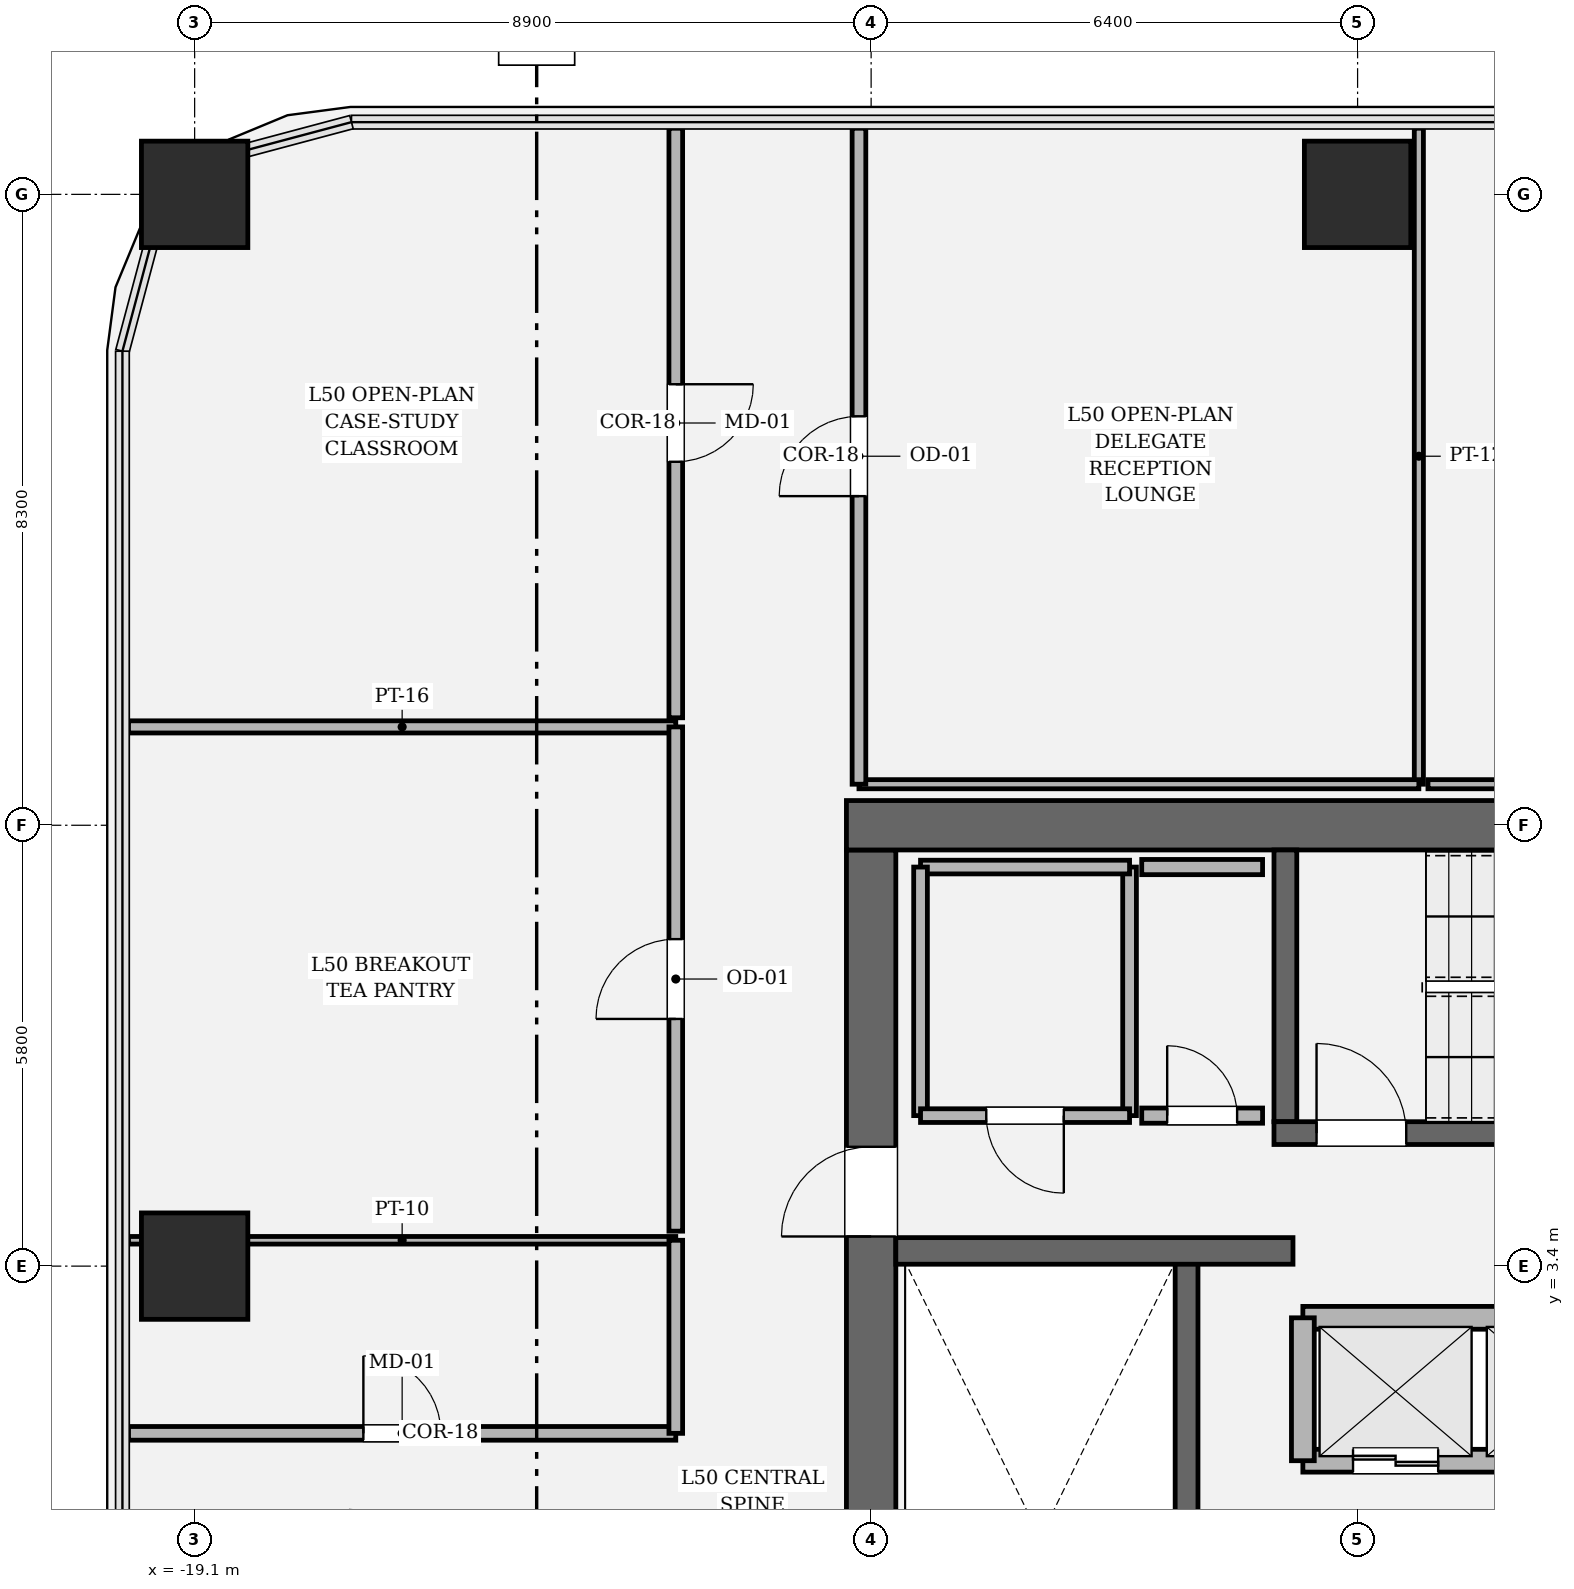
"""IFC4 building model, lengths in metres.
Left out: names, types, materials, properties, quantities, classifications, styles, units other than length and angle.
Written with IfcOpenShell. Run it as: python <this file> out.ifc"""

import sys

from ifc_helpers import new_model, si_unit, direction, frame, frame_2d, origin, origin_2d, place, context, subcontext, project, spatial, rectangle, hollow_rectangle, extrude, element, fill, save


model = new_model("IFC4")
c1 = context("Model", 3, precision=1e-05, world=origin(), true_north=direction((0.0, 1.0)))
c2 = subcontext(c1, "Body", "Model", "MODEL_VIEW")
j1 = project(units=[si_unit("LENGTHUNIT", "METRE"), si_unit("PLANEANGLEUNIT", "RADIAN")], contexts=[c1])
p1 = place(None, origin())
s1 = spatial("IfcSite", under=j1, at=p1, CompositionType="ELEMENT")
p2 = place(p1, origin())
s2 = spatial("IfcBuilding", under=s1, at=p2, CompositionType="ELEMENT")
p3 = place(p2, frame((0.0, 0.0, 212.7)))
s3 = spatial("IfcBuildingStorey", under=s2, at=p3, CompositionType="ELEMENT", Elevation=212.7)
p4 = place(p3, frame((-10.2, -8.875, 0.0), z_axis=(0.0, 0.0, 1.0), x_axis=(0.0, 1.0, 0.0)))
e1 = element("IfcWall", 1, at=p4, inside=s3, PredefinedType="SHEAR", context=c2, shape_type="SweptSolid", body=[
    extrude(rectangle(XDim=17.75, YDim=0.65, at=frame_2d((8.875, 0.0))), origin(), (0.0, 0.0, 1.0), 4.05),
])
p5 = place(p4, frame((12.665, 0.0, 0.0)))
e2 = element("IfcOpeningElement", 2, at=p5, cuts=e1, PredefinedType="OPENING", context=c2, shape_type="SweptSolid", body=[
    extrude(rectangle(XDim=1.18, YDim=2.2, at=frame_2d((0.59, 1.1))), frame((0.0, 0.335, 0.0), z_axis=(0.0, -1.0, 0.0), x_axis=(1.0, 0.0, 0.0)), (0.0, 0.0, 1.0), 0.67),
])
p6 = place(p3, frame((-10.525, 9.2, 0.0), z_axis=(0.0, 0.0, 1.0), x_axis=(1.0, 0.0, 0.0)))
e3 = element("IfcWall", 3, at=p6, inside=s3, PredefinedType="SHEAR", context=c2, shape_type="SweptSolid", body=[
    extrude(rectangle(XDim=21.05, YDim=0.65, at=frame_2d((10.525, 0.0))), origin(), (0.0, 0.0, 1.0), 4.05),
])
p7 = place(p3, frame((-6.05, -5.5, 0.0), z_axis=(0.0, 0.0, 1.0), x_axis=(0.0, 1.0, 0.0)))
e4 = element("IfcWall", 4, at=p7, inside=s3, PredefinedType="SOLIDWALL", context=c2, shape_type="SweptSolid", body=[
    extrude(rectangle(XDim=8.95, YDim=0.3, at=frame_2d((4.475, 0.0))), origin(), (0.0, 0.0, 1.0), 4.05),
])
p8 = place(p3, frame((-4.75, 5.3, 0.0), z_axis=(0.0, 0.0, 1.0), x_axis=(0.0, 1.0, 0.0)))
e5 = element("IfcWall", 5, at=p8, inside=s3, PredefinedType="SOLIDWALL", context=c2, shape_type="SweptSolid", body=[
    extrude(rectangle(XDim=3.575, YDim=0.3, at=frame_2d((1.788, 0.0))), origin(), (0.0, 0.0, 1.0), 4.05),
])
p9 = place(p3, frame((-4.9, 5.15, 0.0), z_axis=(0.0, 0.0, 1.0), x_axis=(1.0, 0.0, 0.0)))
e6 = element("IfcWall", 6, at=p9, inside=s3, PredefinedType="SOLIDWALL", context=c2, shape_type="SweptSolid", body=[
    extrude(rectangle(XDim=9.8, YDim=0.3, at=frame_2d((4.9, 0.0))), origin(), (0.0, 0.0, 1.0), 4.05),
])
p10 = place(p9, frame((0.56, 0.0, 0.0)))
e7 = element("IfcOpeningElement", 7, at=p10, cuts=e6, PredefinedType="OPENING", context=c2, shape_type="SweptSolid", body=[
    extrude(rectangle(XDim=1.18, YDim=2.2, at=frame_2d((0.59, 1.1))), frame((0.0, 0.16, 0.0), z_axis=(0.0, -1.0, 0.0), x_axis=(1.0, 0.0, 0.0)), (0.0, 0.0, 1.0), 0.32),
])
p11 = place(p3, frame((-9.875, 3.6, 0.0), z_axis=(0.0, 0.0, 1.0), x_axis=(1.0, 0.0, 0.0)))
e8 = element("IfcWall", 8, at=p11, inside=s3, PredefinedType="SOLIDWALL", context=c2, shape_type="SweptSolid", body=[
    extrude(rectangle(XDim=5.225, YDim=0.35, at=frame_2d((2.613, 0.0))), origin(), (0.0, 0.0, 1.0), 4.05),
])
for number, where, z_axis, x_axis in (
    (9, (-3.8, 17.5, 0.0), (0.0, 0.0, 1.0), (1.0, 0.0, 0.0)),
    (10, (-19.1, 17.5, 0.0), (0.0, 0.0, 1.0), (1.0, 0.0, 0.0)),
    (11, (-19.1, 3.4, 0.0), (0.0, 0.0, 1.0), (1.0, 0.0, 0.0)),
):
    element("IfcColumn", number, at=place(p3, frame(where, z_axis=z_axis, x_axis=x_axis)), inside=s3, PredefinedType="COLUMN", context=c2, shape_type="SweptSolid", body=[
        extrude(hollow_rectangle(XDim=1.4, YDim=1.4, WallThickness=0.042, at=origin_2d()), origin(), (0.0, 0.0, 1.0), 4.05),
    ])
p12 = place(p3, frame((-4.52, 0.84, 0.0), z_axis=(0.0, 0.0, 1.0), x_axis=(1.0, 0.0, 0.0)))
e12 = element("IfcWall", 12, at=p12, inside=s3, PredefinedType="SOLIDWALL", context=c2, shape_type="SweptSolid", body=[
    extrude(rectangle(XDim=9.04, YDim=0.3, at=frame_2d((4.52, 0.0))), origin(), (0.0, 0.0, 1.0), 3.83),
])
p13 = place(p12, frame((0.66, 0.0, 0.0)))
e13 = element("IfcOpeningElement", 13, at=p13, cuts=e12, PredefinedType="OPENING", context=c2, shape_type="SweptSolid", body=[
    extrude(rectangle(XDim=1.12, YDim=2.25, at=frame_2d((0.56, 1.125))), frame((0.0, 0.16, 0.0), z_axis=(0.0, -1.0, 0.0), x_axis=(1.0, 0.0, 0.0)), (0.0, 0.0, 1.0), 0.32),
])
p14 = place(p12, frame((2.86, 0.0, 0.0)))
e14 = element("IfcOpeningElement", 14, at=p14, cuts=e12, PredefinedType="OPENING", context=c2, shape_type="SweptSolid", body=[
    extrude(rectangle(XDim=1.12, YDim=2.25, at=frame_2d((0.56, 1.125))), frame((0.0, 0.16, 0.0), z_axis=(0.0, -1.0, 0.0), x_axis=(1.0, 0.0, 0.0)), (0.0, 0.0, 1.0), 0.32),
])
p15 = place(p12, frame((5.06, 0.0, 0.0)))
e15 = element("IfcOpeningElement", 15, at=p15, cuts=e12, PredefinedType="OPENING", context=c2, shape_type="SweptSolid", body=[
    extrude(rectangle(XDim=1.12, YDim=2.25, at=frame_2d((0.56, 1.125))), frame((0.0, 0.16, 0.0), z_axis=(0.0, -1.0, 0.0), x_axis=(1.0, 0.0, 0.0)), (0.0, 0.0, 1.0), 0.32),
])
p16 = place(p12, frame((7.26, 0.0, 0.0)))
e16 = element("IfcOpeningElement", 16, at=p16, cuts=e12, PredefinedType="OPENING", context=c2, shape_type="SweptSolid", body=[
    extrude(rectangle(XDim=1.12, YDim=2.25, at=frame_2d((0.56, 1.125))), frame((0.0, 0.16, 0.0), z_axis=(0.0, -1.0, 0.0), x_axis=(1.0, 0.0, 0.0)), (0.0, 0.0, 1.0), 0.32),
])
p17 = place(p3, frame((-4.52, 2.72, 0.0), z_axis=(0.0, 0.0, 1.0), x_axis=(1.0, 0.0, 0.0)))
e17 = element("IfcWall", 17, at=p17, inside=s3, PredefinedType="SOLIDWALL", context=c2, shape_type="SweptSolid", body=[
    extrude(rectangle(XDim=9.04, YDim=0.3, at=frame_2d((4.52, 0.0))), origin(), (0.0, 0.0, 1.0), 3.83),
])
p18 = place(p3, frame((-4.52, 0.84, 0.0), z_axis=(0.0, 0.0, 1.0), x_axis=(0.0, 1.0, 0.0)))
e18 = element("IfcWall", 18, at=p18, inside=s3, PredefinedType="SOLIDWALL", context=c2, shape_type="SweptSolid", body=[
    extrude(rectangle(XDim=1.88, YDim=0.3, at=frame_2d((0.94, 0.0))), origin(), (0.0, 0.0, 1.0), 3.83),
])
p19 = place(p3, frame((-6.8, 5.38, 0.0), z_axis=(0.0, 0.0, 1.0), x_axis=(0.0, 1.0, 0.0)))
e19 = element("IfcWall", 19, at=p19, inside=s3, PredefinedType="PARTITIONING", context=c2, shape_type="SweptSolid", body=[
    extrude(rectangle(XDim=3.27, YDim=0.18, at=frame_2d((1.635, 0.0))), origin(), (0.0, 0.0, 1.0), 3.83),
])
p20 = place(p3, frame((-6.8, 8.65, 0.0), z_axis=(0.0, 0.0, 1.0), x_axis=(-1.0, 0.0, 0.0)))
e20 = element("IfcWall", 20, at=p20, inside=s3, PredefinedType="PARTITIONING", context=c2, shape_type="SweptSolid", body=[
    extrude(rectangle(XDim=2.75, YDim=0.18, at=frame_2d((1.375, 0.0))), origin(), (0.0, 0.0, 1.0), 3.83),
])
p21 = place(p3, frame((-9.55, 8.65, 0.0), z_axis=(0.0, 0.0, 1.0), x_axis=(0.0, -1.0, 0.0)))
e21 = element("IfcWall", 21, at=p21, inside=s3, PredefinedType="PARTITIONING", context=c2, shape_type="SweptSolid", body=[
    extrude(rectangle(XDim=3.27, YDim=0.18, at=frame_2d((1.635, 0.0))), origin(), (0.0, 0.0, 1.0), 3.83),
])
p22 = place(p3, frame((-9.55, 5.38, 0.0), z_axis=(0.0, 0.0, 1.0), x_axis=(1.0, 0.0, 0.0)))
e22 = element("IfcWall", 22, at=p22, inside=s3, PredefinedType="PARTITIONING", context=c2, shape_type="SweptSolid", body=[
    extrude(rectangle(XDim=2.75, YDim=0.18, at=frame_2d((1.375, 0.0))), origin(), (0.0, 0.0, 1.0), 3.83),
])
p23 = place(p22, frame((0.865, 0.0, 0.0)))
e23 = element("IfcOpeningElement", 23, at=p23, cuts=e22, PredefinedType="OPENING", context=c2, shape_type="SweptSolid", body=[
    extrude(rectangle(XDim=1.02, YDim=2.2, at=frame_2d((0.51, 1.1))), frame((0.0, 0.1, 0.0), z_axis=(0.0, -1.0, 0.0), x_axis=(1.0, 0.0, 0.0)), (0.0, 0.0, 1.0), 0.2),
])
p24 = place(p3, frame((-5.05, 8.65, 0.0), z_axis=(0.0, 0.0, 1.0), x_axis=(-1.0, 0.0, 0.0)))
e24 = element("IfcWall", 24, at=p24, inside=s3, PredefinedType="SOLIDWALL", context=c2, shape_type="SweptSolid", body=[
    extrude(rectangle(XDim=1.59, YDim=0.2, at=frame_2d((0.795, 0.0))), origin(), (0.0, 0.0, 1.0), 3.83),
])
p25 = place(p3, frame((-6.64, 5.38, 0.0), z_axis=(0.0, 0.0, 1.0), x_axis=(1.0, 0.0, 0.0)))
e25 = element("IfcWall", 25, at=p25, inside=s3, PredefinedType="SOLIDWALL", context=c2, shape_type="SweptSolid", body=[
    extrude(rectangle(XDim=1.59, YDim=0.2, at=frame_2d((0.795, 0.0))), origin(), (0.0, 0.0, 1.0), 3.83),
])
p26 = place(p25, frame((0.335, 0.0, 0.0)))
e26 = element("IfcOpeningElement", 26, at=p26, cuts=e25, PredefinedType="OPENING", context=c2, shape_type="SweptSolid", body=[
    extrude(rectangle(XDim=0.92, YDim=2.1, at=frame_2d((0.46, 1.05))), frame((0.0, 0.11, 0.0), z_axis=(0.0, -1.0, 0.0), x_axis=(1.0, 0.0, 0.0)), (0.0, 0.0, 1.0), 0.22),
])
p27 = place(p3, frame((-12.77, 1.2, 0.0), z_axis=(0.0, 0.0, 1.0), x_axis=(-1.0, 0.0, 0.0)))
e27 = element("IfcWall", 27, at=p27, inside=s3, PredefinedType="PARTITIONING", context=c2, shape_type="SweptSolid", body=[
    extrude(rectangle(XDim=7.2, YDim=0.18, at=frame_2d((3.6, 0.0))), origin(), (0.0, 0.0, 1.0), 3.174),
])
p28 = place(p27, frame((3.09, 0.0, 0.0)))
e28 = element("IfcOpeningElement", 28, at=p28, cuts=e27, PredefinedType="OPENING", context=c2, shape_type="SweptSolid", body=[
    extrude(rectangle(XDim=1.02, YDim=2.2, at=frame_2d((0.51, 1.1))), frame((0.0, 0.1, 0.0), z_axis=(0.0, -1.0, 0.0), x_axis=(1.0, 0.0, 0.0)), (0.0, 0.0, 1.0), 0.2),
])
p29 = place(p3, frame((-19.97, 3.74, 0.0), z_axis=(0.0, 0.0, 1.0), x_axis=(1.0, 0.0, 0.0)))
e29 = element("IfcWall", 29, at=p29, inside=s3, PredefinedType="PARTITIONING", context=c2, shape_type="SweptSolid", body=[
    extrude(rectangle(XDim=7.2, YDim=0.1, at=frame_2d((3.6, 0.0))), origin(), (0.0, 0.0, 1.0), 3.174),
])
p30 = place(p3, frame((-12.77, 3.74, 0.0), z_axis=(0.0, 0.0, 1.0), x_axis=(0.0, -1.0, 0.0)))
e30 = element("IfcWall", 30, at=p30, inside=s3, PredefinedType="PARTITIONING", context=c2, shape_type="SweptSolid", body=[
    extrude(rectangle(XDim=2.54, YDim=0.18, at=frame_2d((1.27, 0.0))), origin(), (0.0, 0.0, 1.0), 3.174),
])
p31 = place(p3, frame((-19.97, 10.494, 0.0), z_axis=(0.0, 0.0, 1.0), x_axis=(1.0, 0.0, 0.0)))
e31 = element("IfcWall", 31, at=p31, inside=s3, PredefinedType="PARTITIONING", context=c2, shape_type="SweptSolid", body=[
    extrude(rectangle(XDim=7.2, YDim=0.16, at=frame_2d((3.6, 0.0))), origin(), (0.0, 0.0, 1.0), 3.174),
])
p32 = place(p3, frame((-12.77, 10.494, 0.0), z_axis=(0.0, 0.0, 1.0), x_axis=(0.0, -1.0, 0.0)))
e32 = element("IfcWall", 32, at=p32, inside=s3, PredefinedType="PARTITIONING", context=c2, shape_type="SweptSolid", body=[
    extrude(rectangle(XDim=6.634, YDim=0.18, at=frame_2d((3.317, 0.0))), origin(), (0.0, 0.0, 1.0), 3.174),
])
p33 = place(p32, frame((2.792, 0.0, 0.0)))
e33 = element("IfcOpeningElement", 33, at=p33, cuts=e32, PredefinedType="OPENING", context=c2, shape_type="SweptSolid", body=[
    extrude(rectangle(XDim=1.05, YDim=2.2, at=frame_2d((0.525, 1.1))), frame((0.0, 0.1, 0.0), z_axis=(0.0, -1.0, 0.0), x_axis=(1.0, 0.0, 0.0)), (0.0, 0.0, 1.0), 0.2),
])
p34 = place(p3, frame((-2.994, 18.37, 0.0), z_axis=(0.0, 0.0, 1.0), x_axis=(0.0, -1.0, 0.0)))
e34 = element("IfcWall", 34, at=p34, inside=s3, PredefinedType="PARTITIONING", context=c2, shape_type="SweptSolid", body=[
    extrude(rectangle(XDim=8.63, YDim=0.12, at=frame_2d((4.315, 0.0))), origin(), (0.0, 0.0, 1.0), 3.174),
])
p35 = place(p3, frame((-2.994, 9.74, 0.0), z_axis=(0.0, 0.0, 1.0), x_axis=(-1.0, 0.0, 0.0)))
e35 = element("IfcWall", 35, at=p35, inside=s3, PredefinedType="PARTITIONING", context=c2, shape_type="SweptSolid", body=[
    extrude(rectangle(XDim=7.366, YDim=0.12, at=frame_2d((3.683, 0.0))), origin(), (0.0, 0.0, 1.0), 3.174),
])
p36 = place(p3, frame((-10.36, 9.74, 0.0), z_axis=(0.0, 0.0, 1.0), x_axis=(0.0, 1.0, 0.0)))
e36 = element("IfcWall", 36, at=p36, inside=s3, PredefinedType="PARTITIONING", context=c2, shape_type="SweptSolid", body=[
    extrude(rectangle(XDim=8.63, YDim=0.18, at=frame_2d((4.315, 0.0))), origin(), (0.0, 0.0, 1.0), 3.174),
])
p37 = place(p36, frame((3.79, 0.0, 0.0)))
e37 = element("IfcOpeningElement", 37, at=p37, cuts=e36, PredefinedType="OPENING", context=c2, shape_type="SweptSolid", body=[
    extrude(rectangle(XDim=1.05, YDim=2.2, at=frame_2d((0.525, 1.1))), frame((0.0, 0.1, 0.0), z_axis=(0.0, -1.0, 0.0), x_axis=(1.0, 0.0, 0.0)), (0.0, 0.0, 1.0), 0.2),
])
p38 = place(p3, frame((10.36, 9.74, 0.0), z_axis=(0.0, 0.0, 1.0), x_axis=(-1.0, 0.0, 0.0)))
e38 = element("IfcWall", 38, at=p38, inside=s3, PredefinedType="PARTITIONING", context=c2, shape_type="SweptSolid", body=[
    extrude(rectangle(XDim=13.234, YDim=0.12, at=frame_2d((6.617, 0.0))), origin(), (0.0, 0.0, 1.0), 3.174),
])
p39 = place(p3, frame((-12.77, 18.37, 0.0), z_axis=(0.0, 0.0, 1.0), x_axis=(0.0, -1.0, 0.0)))
e39 = element("IfcWall", 39, at=p39, inside=s3, PredefinedType="PARTITIONING", context=c2, shape_type="SweptSolid", body=[
    extrude(rectangle(XDim=7.756, YDim=0.18, at=frame_2d((3.878, 0.0))), origin(), (0.0, 0.0, 1.0), 3.174),
])
p40 = place(p39, frame((3.368, 0.0, 0.0)))
e40 = element("IfcOpeningElement", 40, at=p40, cuts=e39, PredefinedType="OPENING", context=c2, shape_type="SweptSolid", body=[
    extrude(rectangle(XDim=1.02, YDim=2.2, at=frame_2d((0.51, 1.1))), frame((0.0, 0.1, 0.0), z_axis=(0.0, -1.0, 0.0), x_axis=(1.0, 0.0, 0.0)), (0.0, 0.0, 1.0), 0.2),
])
p41 = place(p10, origin())
e41 = element("IfcDoor", 41, at=p41, inside=s3, OperationType="SINGLE_SWING_LEFT", PredefinedType="DOOR", context=c2, shape_type="SweptSolid", body=[
    extrude(rectangle(XDim=1.18, YDim=2.2, at=frame_2d((0.59, 1.1))), frame((0.0, 0.025, 0.0), z_axis=(0.0, -1.0, 0.0), x_axis=(1.0, 0.0, 0.0)), (0.0, 0.0, 1.0), 0.05),
])
fill(e7, e41)
p42 = place(p5, origin())
e42 = element("IfcDoor", 42, at=p42, inside=s3, OperationType="SINGLE_SWING_LEFT", PredefinedType="DOOR", context=c2, shape_type="SweptSolid", body=[
    extrude(rectangle(XDim=1.18, YDim=2.2, at=frame_2d((0.59, 1.1))), frame((0.0, 0.025, 0.0), z_axis=(0.0, -1.0, 0.0), x_axis=(1.0, 0.0, 0.0)), (0.0, 0.0, 1.0), 0.05),
])
fill(e2, e42)
p43 = place(p13, origin())
e43 = element("IfcDoor", 43, at=p43, inside=s3, OperationType="DOUBLE_DOOR_SLIDING", PredefinedType="DOOR", context=c2, shape_type="SweptSolid", body=[
    extrude(rectangle(XDim=1.12, YDim=2.25, at=frame_2d((0.56, 1.125))), frame((0.0, 0.025, 0.0), z_axis=(0.0, -1.0, 0.0), x_axis=(1.0, 0.0, 0.0)), (0.0, 0.0, 1.0), 0.05),
])
fill(e13, e43)
p44 = place(p23, origin())
e44 = element("IfcDoor", 44, at=p44, inside=s3, OperationType="SINGLE_SWING_RIGHT", PredefinedType="DOOR", context=c2, shape_type="SweptSolid", body=[
    extrude(rectangle(XDim=1.02, YDim=2.2, at=frame_2d((0.51, 1.1))), frame((0.0, 0.025, 0.0), z_axis=(0.0, -1.0, 0.0), x_axis=(1.0, 0.0, 0.0)), (0.0, 0.0, 1.0), 0.05),
])
fill(e23, e44)
p45 = place(p26, origin())
e45 = element("IfcDoor", 45, at=p45, inside=s3, OperationType="SINGLE_SWING_LEFT", PredefinedType="DOOR", context=c2, shape_type="SweptSolid", body=[
    extrude(rectangle(XDim=0.92, YDim=2.1, at=frame_2d((0.46, 1.05))), frame((0.0, 0.025, 0.0), z_axis=(0.0, -1.0, 0.0), x_axis=(1.0, 0.0, 0.0)), (0.0, 0.0, 1.0), 0.05),
])
fill(e26, e45)
p46 = place(p28, origin())
e46 = element("IfcDoor", 46, at=p46, inside=s3, OperationType="SINGLE_SWING_RIGHT", PredefinedType="DOOR", context=c2, shape_type="SweptSolid", body=[
    extrude(rectangle(XDim=1.02, YDim=2.2, at=frame_2d((0.51, 1.1))), frame((0.0, 0.025, 0.0), z_axis=(0.0, -1.0, 0.0), x_axis=(1.0, 0.0, 0.0)), (0.0, 0.0, 1.0), 0.05),
])
fill(e28, e46)
p47 = place(p33, origin())
e47 = element("IfcDoor", 47, at=p47, inside=s3, OperationType="SINGLE_SWING_RIGHT", PredefinedType="DOOR", context=c2, shape_type="SweptSolid", body=[
    extrude(rectangle(XDim=1.05, YDim=2.2, at=frame_2d((0.525, 1.1))), frame((0.0, 0.025, 0.0), z_axis=(0.0, -1.0, 0.0), x_axis=(1.0, 0.0, 0.0)), (0.0, 0.0, 1.0), 0.05),
])
fill(e33, e47)
p48 = place(p37, origin())
e48 = element("IfcDoor", 48, at=p48, inside=s3, OperationType="SINGLE_SWING_LEFT", PredefinedType="DOOR", context=c2, shape_type="SweptSolid", body=[
    extrude(rectangle(XDim=1.05, YDim=2.2, at=frame_2d((0.525, 1.1))), frame((0.0, 0.025, 0.0), z_axis=(0.0, -1.0, 0.0), x_axis=(1.0, 0.0, 0.0)), (0.0, 0.0, 1.0), 0.05),
])
fill(e37, e48)
p49 = place(p40, origin())
e49 = element("IfcDoor", 49, at=p49, inside=s3, OperationType="SINGLE_SWING_LEFT", PredefinedType="DOOR", context=c2, shape_type="SweptSolid", body=[
    extrude(rectangle(XDim=1.02, YDim=2.2, at=frame_2d((0.51, 1.1))), frame((0.0, 0.025, 0.0), z_axis=(0.0, -1.0, 0.0), x_axis=(1.0, 0.0, 0.0)), (0.0, 0.0, 1.0), 0.05),
])
fill(e40, e49)
save(model, sys.argv[1])
